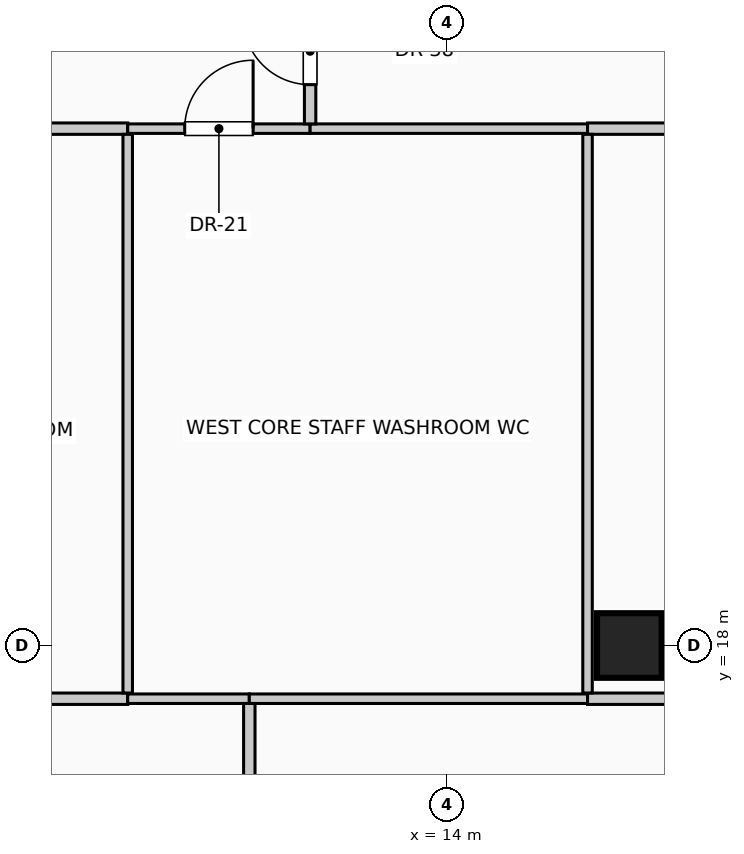
"""IFC4 building model, lengths in metres.
Left out: names, types, materials, properties, quantities, classifications, styles, units other than length and angle.
Written with IfcOpenShell. Run it as: python <this file> out.ifc"""

import sys

from ifc_helpers import new_model, si_unit, direction, frame, frame_2d, origin, origin_2d, place, context, subcontext, project, spatial, rectangle, circle, extrude, element, fill, save


model = new_model("IFC4")
c1 = context("Model", 3, precision=1e-05, world=origin(), true_north=direction((0.0, 1.0)))
c2 = subcontext(c1, "Body", "Model", "MODEL_VIEW")
j1 = project(units=[si_unit("LENGTHUNIT", "METRE"), si_unit("PLANEANGLEUNIT", "RADIAN")], contexts=[c1])
p1 = place(None, origin())
s1 = spatial("IfcSite", under=j1, at=p1, CompositionType="ELEMENT")
p2 = place(p1, origin())
s2 = spatial("IfcBuilding", under=s1, at=p2, CompositionType="ELEMENT")
p3 = place(p2, frame((0.0, 0.0, 190.6)))
s3 = spatial("IfcBuildingStorey", under=s2, at=p3, CompositionType="ELEMENT", Elevation=190.6)
p4 = place(p3, frame((16.4, 18.0, 0.0), z_axis=(0.0, 0.0, 1.0), x_axis=(1.0, 0.0, 0.0)))
e1 = element("IfcColumn", 1, at=p4, inside=s3, PredefinedType="COLUMN", context=c2, shape_type="SweptSolid", body=[
    extrude(circle(Radius=0.425, at=origin_2d()), origin(), (0.0, 0.0, 1.0), 4.0),
])
p5 = place(p3, frame((3.55, 17.3, 0.0), z_axis=(0.0, 0.0, 1.0), x_axis=(1.0, 0.0, 0.0)))
e2 = element("IfcWall", 2, at=p5, inside=s3, PredefinedType="PARTITIONING", context=c2, shape_type="SweptSolid", body=[
    extrude(rectangle(XDim=6.25, YDim=0.15, at=frame_2d((3.125, 0.0))), origin(), (0.0, 0.0, 1.0), 3.75),
])
p6 = place(p3, frame((9.8, 17.3, 0.0), z_axis=(0.0, 0.0, 1.0), x_axis=(1.0, 0.0, 0.0)))
e3 = element("IfcWall", 3, at=p6, inside=s3, PredefinedType="PARTITIONING", context=c2, shape_type="SweptSolid", body=[
    extrude(rectangle(XDim=1.6, YDim=0.125, at=frame_2d((0.8, 0.0))), origin(), (0.0, 0.0, 1.0), 3.75),
])
p7 = place(p3, frame((11.4, 17.3, 0.0), z_axis=(0.0, 0.0, 1.0), x_axis=(1.0, 0.0, 0.0)))
e4 = element("IfcWall", 4, at=p7, inside=s3, PredefinedType="PARTITIONING", context=c2, shape_type="SweptSolid", body=[
    extrude(rectangle(XDim=4.45, YDim=0.125, at=frame_2d((2.225, 0.0))), origin(), (0.0, 0.0, 1.0), 3.75),
])
p8 = place(p3, frame((15.85, 17.3, 0.0), z_axis=(0.0, 0.0, 1.0), x_axis=(1.0, 0.0, 0.0)))
e5 = element("IfcWall", 5, at=p8, inside=s3, PredefinedType="PARTITIONING", context=c2, shape_type="SweptSolid", body=[
    extrude(rectangle(XDim=2.35, YDim=0.15, at=frame_2d((1.175, 0.0))), origin(), (0.0, 0.0, 1.0), 3.75),
])
p9 = place(p3, frame((3.55, 24.8, 0.0), z_axis=(0.0, 0.0, 1.0), x_axis=(1.0, 0.0, 0.0)))
e6 = element("IfcWall", 6, at=p9, inside=s3, PredefinedType="PARTITIONING", context=c2, shape_type="SweptSolid", body=[
    extrude(rectangle(XDim=6.25, YDim=0.15, at=frame_2d((3.125, 0.0))), origin(), (0.0, 0.0, 1.0), 3.75),
])
p10 = place(p9, frame((2.65, 0.0, 0.0)))
e7 = element("IfcOpeningElement", 7, at=p10, cuts=e6, PredefinedType="OPENING", context=c2, shape_type="SweptSolid", body=[
    extrude(rectangle(XDim=0.95, YDim=2.15, at=frame_2d((0.475, 1.075))), frame((0.0, 0.085, 0.0), z_axis=(0.0, -1.0, 0.0), x_axis=(1.0, 0.0, 0.0)), (0.0, 0.0, 1.0), 0.17),
])
p11 = place(p3, frame((9.8, 24.8, 0.0), z_axis=(0.0, 0.0, 1.0), x_axis=(1.0, 0.0, 0.0)))
e8 = element("IfcWall", 8, at=p11, inside=s3, PredefinedType="PARTITIONING", context=c2, shape_type="SweptSolid", body=[
    extrude(rectangle(XDim=2.4, YDim=0.125, at=frame_2d((1.2, 0.0))), origin(), (0.0, 0.0, 1.0), 3.75),
])
p12 = place(p11, frame((0.75, 0.0, 0.0)))
e9 = element("IfcOpeningElement", 9, at=p12, cuts=e8, PredefinedType="OPENING", context=c2, shape_type="SweptSolid", body=[
    extrude(rectangle(XDim=0.9, YDim=2.1, at=frame_2d((0.45, 1.05))), frame((0.0, 0.073, 0.0), z_axis=(0.0, -1.0, 0.0), x_axis=(1.0, 0.0, 0.0)), (0.0, 0.0, 1.0), 0.145),
])
p13 = place(p3, frame((12.2, 24.8, 0.0), z_axis=(0.0, 0.0, 1.0), x_axis=(1.0, 0.0, 0.0)))
e10 = element("IfcWall", 10, at=p13, inside=s3, PredefinedType="PARTITIONING", context=c2, shape_type="SweptSolid", body=[
    extrude(rectangle(XDim=3.65, YDim=0.125, at=frame_2d((1.825, 0.0))), origin(), (0.0, 0.0, 1.0), 3.75),
])
p14 = place(p3, frame((15.85, 24.8, 0.0), z_axis=(0.0, 0.0, 1.0), x_axis=(1.0, 0.0, 0.0)))
e11 = element("IfcWall", 11, at=p14, inside=s3, PredefinedType="PARTITIONING", context=c2, shape_type="SweptSolid", body=[
    extrude(rectangle(XDim=5.15, YDim=0.15, at=frame_2d((2.575, 0.0))), origin(), (0.0, 0.0, 1.0), 3.75),
])
p15 = place(p3, frame((9.8, 17.375, 0.0), z_axis=(0.0, 0.0, 1.0), x_axis=(0.0, 1.0, 0.0)))
e12 = element("IfcWall", 12, at=p15, inside=s3, PredefinedType="PARTITIONING", context=c2, shape_type="SweptSolid", body=[
    extrude(rectangle(XDim=7.35, YDim=0.125, at=frame_2d((3.675, 0.0))), origin(), (0.0, 0.0, 1.0), 3.75),
])
p16 = place(p3, frame((11.4, 10.39, 0.0), z_axis=(0.0, 0.0, 1.0), x_axis=(0.0, 1.0, 0.0)))
e13 = element("IfcWall", 13, at=p16, inside=s3, PredefinedType="PARTITIONING", context=c2, shape_type="SweptSolid", body=[
    extrude(rectangle(XDim=6.848, YDim=0.15, at=frame_2d((3.424, 0.0))), origin(), (0.0, 0.0, 1.0), 3.75),
])
p17 = place(p3, frame((12.2, 24.863, 0.0), z_axis=(0.0, 0.0, 1.0), x_axis=(0.0, 1.0, 0.0)))
e14 = element("IfcWall", 14, at=p17, inside=s3, PredefinedType="PARTITIONING", context=c2, shape_type="SweptSolid", body=[
    extrude(rectangle(XDim=1.912, YDim=0.15, at=frame_2d((0.956, 0.0))), origin(), (0.0, 0.0, 1.0), 3.75),
])
p18 = place(p17, frame((0.516, 0.0, 0.0)))
e15 = element("IfcOpeningElement", 15, at=p18, cuts=e14, PredefinedType="OPENING", context=c2, shape_type="SweptSolid", body=[
    extrude(rectangle(XDim=0.88, YDim=2.1, at=frame_2d((0.44, 1.05))), frame((0.0, 0.085, 0.0), z_axis=(0.0, -1.0, 0.0), x_axis=(1.0, 0.0, 0.0)), (0.0, 0.0, 1.0), 0.17),
])
p19 = place(p3, frame((15.85, 17.375, 0.0), z_axis=(0.0, 0.0, 1.0), x_axis=(0.0, 1.0, 0.0)))
e16 = element("IfcWall", 16, at=p19, inside=s3, PredefinedType="PARTITIONING", context=c2, shape_type="SweptSolid", body=[
    extrude(rectangle(XDim=7.35, YDim=0.125, at=frame_2d((3.675, 0.0))), origin(), (0.0, 0.0, 1.0), 3.75),
])
p20 = place(p12, origin())
e17 = element("IfcDoor", 17, at=p20, inside=s3, OperationType="SINGLE_SWING_RIGHT", PredefinedType="DOOR", context=c2, shape_type="SweptSolid", body=[
    extrude(rectangle(XDim=0.9, YDim=2.1, at=frame_2d((0.45, 1.05))), frame((0.0, 0.025, 0.0), z_axis=(0.0, -1.0, 0.0), x_axis=(1.0, 0.0, 0.0)), (0.0, 0.0, 1.0), 0.05),
])
fill(e9, e17)
p21 = place(p18, origin())
e18 = element("IfcDoor", 18, at=p21, inside=s3, OperationType="SINGLE_SWING_RIGHT", PredefinedType="DOOR", context=c2, shape_type="SweptSolid", body=[
    extrude(rectangle(XDim=0.88, YDim=2.1, at=frame_2d((0.44, 1.05))), frame((0.0, 0.025, 0.0), z_axis=(0.0, -1.0, 0.0), x_axis=(1.0, 0.0, 0.0)), (0.0, 0.0, 1.0), 0.05),
])
fill(e15, e18)
save(model, sys.argv[1])
